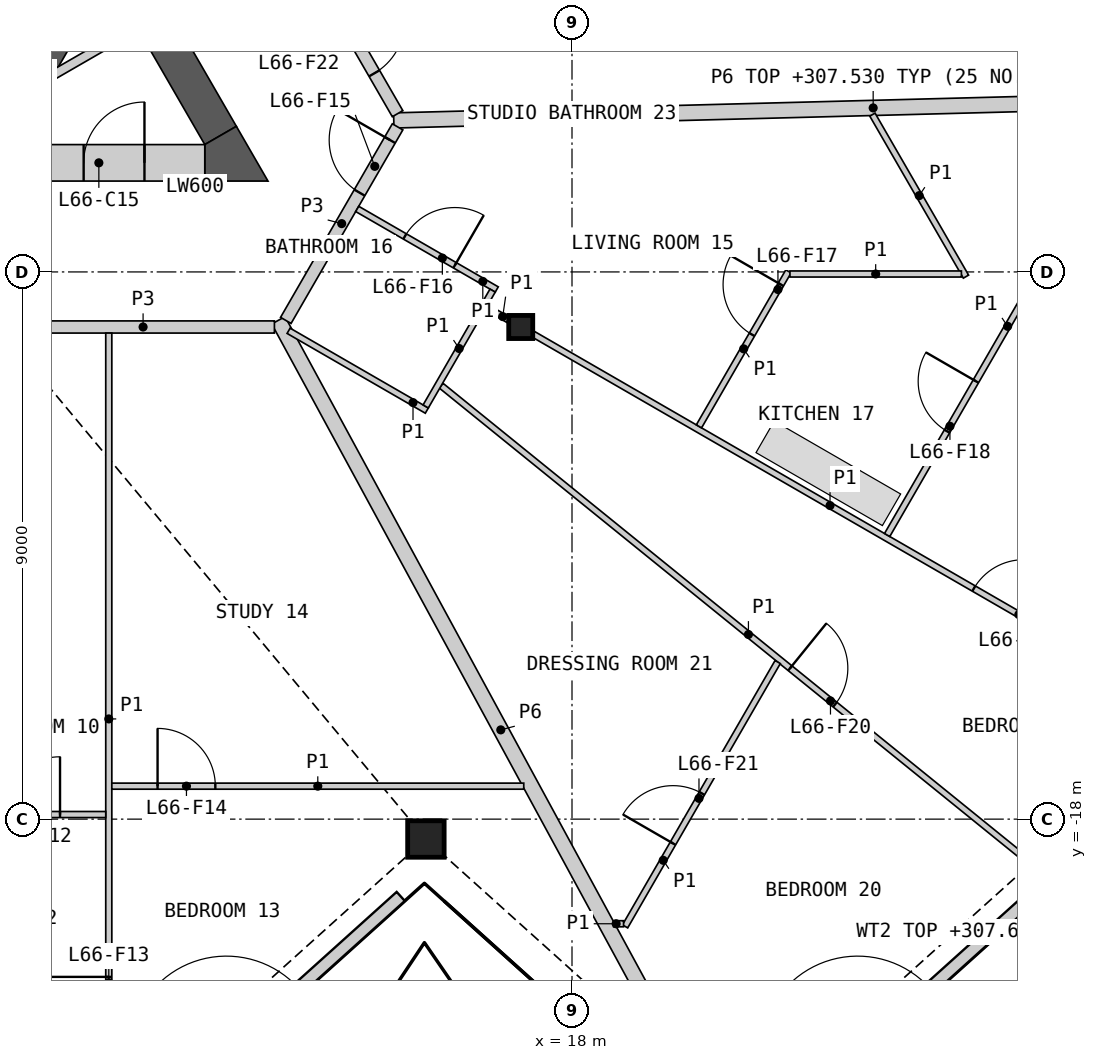
"""IFC4 building model, lengths in metres.
Left out: names, types, materials, properties, quantities, classifications, styles, units other than length and angle.
Written with IfcOpenShell. Run it as: python <this file> out.ifc"""

import sys

from ifc_helpers import new_model, si_unit, direction, frame, frame_2d, origin, origin_2d, place, context, subcontext, project, spatial, polyline, rectangle, hollow_rectangle, i_section, outline, extrude, element, fill, save


model = new_model("IFC4")
c1 = context("Model", 3, precision=1e-05, world=origin(), true_north=direction((0.0, 1.0)))
c2 = subcontext(c1, "Body", "Model", "MODEL_VIEW")
j1 = project(units=[si_unit("LENGTHUNIT", "METRE"), si_unit("PLANEANGLEUNIT", "RADIAN")], contexts=[c1])
p1 = place(None, origin())
s1 = spatial("IfcSite", under=j1, at=p1, CompositionType="ELEMENT")
p2 = place(p1, origin())
s2 = spatial("IfcBuilding", under=s1, at=p2, CompositionType="ELEMENT")
p3 = place(p2, frame((0.0, 0.0, 305.2)))
s3 = spatial("IfcBuildingStorey", under=s2, at=p3, CompositionType="ELEMENT", Elevation=305.2)
p4 = place(p3, frame((15.597, -18.327, 0.0), z_axis=(0.0, 0.0, 1.0), x_axis=(1.0, 0.0, 0.0)))
e1 = element("IfcColumn", 1, at=p4, inside=s3, PredefinedType="COLUMN", context=c2, shape_type="SweptSolid", body=[
    extrude(hollow_rectangle(XDim=0.6, YDim=0.6, WallThickness=0.04, at=origin_2d()), origin(), (0.0, 0.0, 1.0), 3.4),
])
p5 = place(p3, frame((17.157, -9.906, 0.0), z_axis=(0.0, 0.0, 1.0), x_axis=(1.0, 0.0, 0.0)))
e2 = element("IfcColumn", 2, at=p5, inside=s3, PredefinedType="COLUMN", context=c2, shape_type="SweptSolid", body=[
    extrude(i_section(OverallWidth=0.396, OverallDepth=0.381, WebThickness=0.019, FlangeThickness=0.03, at=origin_2d()), origin(), (0.0, 0.0, 1.0), 3.4),
])
p6 = place(p3, frame((10.485, -23.501, 0.0), z_axis=(0.0, 0.0, 1.0), x_axis=(0.743134744054, 0.669141802745, 0.0)))
e3 = element("IfcWall", 3, at=p6, inside=s3, PredefinedType="SOLIDWALL", context=c2, shape_type="SweptSolid", body=[
    extrude(rectangle(XDim=6.322, YDim=0.2, at=frame_2d((3.161, 0.0))), origin(), (0.0, 0.0, 1.0), 2.488),
])
p7 = place(p6, frame((2.463, 0.0, 0.0)))
e4 = element("IfcOpeningElement", 4, at=p7, cuts=e3, PredefinedType="OPENING", context=c2, shape_type="SweptSolid", body=[
    extrude(rectangle(XDim=1.6, YDim=2.25, at=frame_2d((0.8, 1.125))), frame((0.0, 0.11, 0.0), z_axis=(0.0, -1.0, 0.0), x_axis=(1.0, 0.0, 0.0)), (0.0, 0.0, 1.0), 0.22),
])
p8 = place(p3, frame((20.806, -23.556, 0.0), z_axis=(0.0, 0.0, 1.0), x_axis=(0.743145048269, 0.669130358924, 0.0)))
e5 = element("IfcWall", 5, at=p8, inside=s3, PredefinedType="SOLIDWALL", context=c2, shape_type="SweptSolid", body=[
    extrude(rectangle(XDim=6.759, YDim=0.2, at=frame_2d((3.379, 0.0))), origin(), (0.0, 0.0, 1.0), 2.488),
])
p9 = place(p8, frame((2.545, 0.0, 0.0)))
e6 = element("IfcOpeningElement", 6, at=p9, cuts=e5, PredefinedType="OPENING", context=c2, shape_type="SweptSolid", body=[
    extrude(rectangle(XDim=1.6, YDim=2.25, at=frame_2d((0.8, 1.125))), frame((0.0, 0.11, 0.0), z_axis=(0.0, -1.0, 0.0), x_axis=(1.0, 0.0, 0.0)), (0.0, 0.0, 1.0), 0.22),
])
p10 = place(p3, frame((30.488, -6.078, 0.0), z_axis=(0.0, 0.0, 1.0), x_axis=(-0.951062515241, 0.308998530908, 0.0)))
e7 = element("IfcWall", 7, at=p10, inside=s3, PredefinedType="SOLIDWALL", context=c2, shape_type="SweptSolid", body=[
    extrude(rectangle(XDim=6.117, YDim=0.2, at=frame_2d((3.059, 0.0))), origin(), (0.0, 0.0, 1.0), 2.488),
])
p11 = place(p10, frame((2.259, 0.0, 0.0)))
e8 = element("IfcOpeningElement", 8, at=p11, cuts=e7, PredefinedType="OPENING", context=c2, shape_type="SweptSolid", body=[
    extrude(rectangle(XDim=1.6, YDim=2.25, at=frame_2d((0.8, 1.125))), frame((0.0, 0.11, 0.0), z_axis=(0.0, -1.0, 0.0), x_axis=(1.0, 0.0, 0.0)), (0.0, 0.0, 1.0), 0.22),
])
p12 = place(p3, origin())
e9 = element("IfcWall", 9, at=p12, inside=s3, PredefinedType="SHEAR", context=c2, shape_type="SweptSolid", body=[
    extrude(outline(polyline([(8.83, -6.881), (10.374, -4.206), (10.032, -4.298), (8.738, -6.539), (8.83, -6.881)])), origin(), (0.0, 0.0, 1.0), 3.1),
])
p13 = place(p3, frame((10.842, -4.967, 0.0), z_axis=(0.0, 0.0, 1.0), x_axis=(-0.866098216386, -0.499873863663, 0.0)))
e10 = element("IfcWall", 10, at=p13, inside=s3, PredefinedType="PARTITIONING", context=c2, shape_type="SweptSolid", body=[
    extrude(rectangle(XDim=1.582, YDim=0.15, at=frame_2d((0.791, 0.0))), origin(), (0.0, 0.0, 1.0), 3.1),
])
p14 = place(p3, frame((12.221, -6.756, 0.0), z_axis=(0.0, 0.0, 1.0), x_axis=(-0.500020646047, 0.866013483456, 0.0)))
e11 = element("IfcWall", 11, at=p14, inside=s3, PredefinedType="SHEAR", context=c2, shape_type="SweptSolid", body=[
    extrude(rectangle(XDim=4.559, YDim=0.6, at=frame_2d((2.28, 0.0))), origin(), (0.0, 0.0, 1.0), 3.1),
])
p15 = place(p3, origin())
e12 = element("IfcWall", 12, at=p15, inside=s3, PredefinedType="SHEAR", context=c2, shape_type="SweptSolid", body=[
    extrude(outline(polyline([(11.961, -7.506), (11.961, -6.906), (12.48, -6.606), (13.0, -7.506), (11.961, -7.506)])), origin(), (0.0, 0.0, 1.0), 3.1),
])
p16 = place(p3, frame((9.369, -7.206, 0.0), z_axis=(0.0, 0.0, 1.0), x_axis=(1.0, 0.0, 0.0)))
e13 = element("IfcWall", 13, at=p16, inside=s3, PredefinedType="SHEAR", context=c2, shape_type="SweptSolid", body=[
    extrude(rectangle(XDim=2.592, YDim=0.6, at=frame_2d((1.296, 0.0))), origin(), (0.0, 0.0, 1.0), 3.1),
])
p17 = place(p16, frame((0.6, 0.0, 0.0)))
e14 = element("IfcOpeningElement", 14, at=p17, cuts=e13, PredefinedType="OPENING", context=c2, shape_type="SweptSolid", body=[
    extrude(rectangle(XDim=1.0, YDim=2.1, at=frame_2d((0.5, 1.05))), frame((0.0, 0.31, 0.0), z_axis=(0.0, -1.0, 0.0), x_axis=(1.0, 0.0, 0.0)), (0.0, 0.0, 1.0), 0.62),
])
p18 = place(p3, frame((15.069, -6.509, 0.0), z_axis=(0.0, 0.0, 1.0), x_axis=(0.999657828615, 0.026157708023, 0.0)))
e15 = element("IfcWall", 15, at=p18, inside=s3, PredefinedType="PARTITIONING", context=c2, shape_type="SweptSolid", body=[
    extrude(rectangle(XDim=15.773, YDim=0.25, at=frame_2d((7.887, 0.0))), origin(), (0.0, 0.0, 1.0), 2.33),
])
p19 = place(p3, frame((13.171, -9.796, 0.0), z_axis=(0.0, 0.0, 1.0), x_axis=(0.477178668135, -0.878806303275, 0.0)))
e16 = element("IfcWall", 16, at=p19, inside=s3, PredefinedType="PARTITIONING", context=c2, shape_type="SweptSolid", body=[
    extrude(rectangle(XDim=15.33, YDim=0.25, at=frame_2d((7.665, 0.0))), origin(), (0.0, 0.0, 1.0), 2.33),
])
p20 = place(p3, frame((8.786, -9.906, 0.0), z_axis=(0.0, 0.0, 1.0), x_axis=(1.0, 0.0, 0.0)))
e17 = element("IfcWall", 17, at=p20, inside=s3, PredefinedType="PARTITIONING", context=c2, shape_type="SweptSolid", body=[
    extrude(rectangle(XDim=4.32, YDim=0.2, at=frame_2d((2.16, 0.0))), origin(), (0.0, 0.0, 1.0), 3.1),
])
p21 = place(p3, frame((12.988, -2.684, 0.0), z_axis=(0.0, 0.0, 1.0), x_axis=(0.500003406062, -0.866023437285, 0.0)))
e18 = element("IfcWall", 18, at=p21, inside=s3, PredefinedType="PARTITIONING", context=c2, shape_type="SweptSolid", body=[
    extrude(rectangle(XDim=4.288, YDim=0.2, at=frame_2d((2.144, 0.0))), origin(), (0.0, 0.0, 1.0), 3.1),
])
p22 = place(p21, frame((2.521, 0.0, 0.0)))
e19 = element("IfcOpeningElement", 19, at=p22, cuts=e18, PredefinedType="OPENING", context=c2, shape_type="SweptSolid", body=[
    extrude(rectangle(XDim=1.0, YDim=2.1, at=frame_2d((0.5, 1.05))), frame((0.0, 0.11, 0.0), z_axis=(0.0, -1.0, 0.0), x_axis=(1.0, 0.0, 0.0)), (0.0, 0.0, 1.0), 0.22),
])
p23 = place(p3, frame((13.293, -9.797, 0.0), z_axis=(0.0, 0.0, 1.0), x_axis=(0.499967746641, 0.866044024469, 0.0)))
e20 = element("IfcWall", 20, at=p23, inside=s3, PredefinedType="PARTITIONING", context=c2, shape_type="SweptSolid", body=[
    extrude(rectangle(XDim=3.676, YDim=0.2, at=frame_2d((1.838, 0.0))), origin(), (0.0, 0.0, 1.0), 3.1),
])
p24 = place(p23, frame((2.426, 0.0, 0.0)))
e21 = element("IfcOpeningElement", 21, at=p24, cuts=e20, PredefinedType="OPENING", context=c2, shape_type="SweptSolid", body=[
    extrude(rectangle(XDim=1.0, YDim=2.1, at=frame_2d((0.5, 1.05))), frame((0.0, 0.11, 0.0), z_axis=(0.0, -1.0, 0.0), x_axis=(1.0, 0.0, 0.0)), (0.0, 0.0, 1.0), 0.22),
])
p25 = place(p3, frame((15.848, -10.871, 0.0), z_axis=(0.0, 0.0, 1.0), x_axis=(0.77713687197, -0.629331615465, 0.0)))
e22 = element("IfcWall", 22, at=p25, inside=s3, PredefinedType="PARTITIONING", context=c2, shape_type="SweptSolid", body=[
    extrude(rectangle(XDim=13.004, YDim=0.1, at=frame_2d((6.502, 0.0))), origin(), (0.0, 0.0, 1.0), 2.33),
])
p26 = place(p25, frame((7.384, 0.0, 0.0)))
e23 = element("IfcOpeningElement", 23, at=p26, cuts=e22, PredefinedType="OPENING", context=c2, shape_type="SweptSolid", body=[
    extrude(rectangle(XDim=0.95, YDim=2.1, at=frame_2d((0.475, 1.05))), frame((0.0, 0.06, 0.0), z_axis=(0.0, -1.0, 0.0), x_axis=(1.0, 0.0, 0.0)), (0.0, 0.0, 1.0), 0.12),
])
p27 = place(p3, frame((10.382, -22.698, 0.0), z_axis=(0.0, 0.0, 1.0), x_axis=(0.0, 1.0, 0.0)))
e24 = element("IfcWall", 24, at=p27, inside=s3, PredefinedType="PARTITIONING", context=c2, shape_type="SweptSolid", body=[
    extrude(rectangle(XDim=12.692, YDim=0.1, at=frame_2d((6.346, 0.0))), origin(), (0.0, 0.0, 1.0), 2.33),
])
p28 = place(p27, frame((1.153, 0.0, 0.0)))
e25 = element("IfcOpeningElement", 25, at=p28, cuts=e24, PredefinedType="OPENING", context=c2, shape_type="SweptSolid", body=[
    extrude(rectangle(XDim=0.95, YDim=2.1, at=frame_2d((0.475, 1.05))), frame((0.0, 0.06, 0.0), z_axis=(0.0, -1.0, 0.0), x_axis=(1.0, 0.0, 0.0)), (0.0, 0.0, 1.0), 0.12),
])
p29 = place(p3, frame((17.365, -10.025, 0.0), z_axis=(0.0, 0.0, 1.0), x_axis=(0.866021046153, -0.500007547564, 0.0)))
e26 = element("IfcWall", 26, at=p29, inside=s3, PredefinedType="PARTITIONING", context=c2, shape_type="SweptSolid", body=[
    extrude(rectangle(XDim=11.267, YDim=0.1, at=frame_2d((5.634, 0.0))), origin(), (0.0, 0.0, 1.0), 2.33),
])
p30 = place(p29, frame((8.364, 0.0, 0.0)))
e27 = element("IfcOpeningElement", 27, at=p30, cuts=e26, PredefinedType="OPENING", context=c2, shape_type="SweptSolid", body=[
    extrude(rectangle(XDim=0.95, YDim=2.1, at=frame_2d((0.475, 1.05))), frame((0.0, 0.06, 0.0), z_axis=(0.0, -1.0, 0.0), x_axis=(1.0, 0.0, 0.0)), (0.0, 0.0, 1.0), 0.12),
])
p31 = place(p3, frame((0.05, -17.924, 0.0), z_axis=(0.0, 0.0, 1.0), x_axis=(1.0, 0.0, 0.0)))
e28 = element("IfcWall", 28, at=p31, inside=s3, PredefinedType="PARTITIONING", context=c2, shape_type="SweptSolid", body=[
    extrude(rectangle(XDim=10.282, YDim=0.1, at=frame_2d((5.141, 0.0))), origin(), (0.0, 0.0, 1.0), 2.33),
])
p32 = place(p31, frame((0.752, 0.0, 0.0)))
e29 = element("IfcOpeningElement", 29, at=p32, cuts=e28, PredefinedType="OPENING", context=c2, shape_type="SweptSolid", body=[
    extrude(rectangle(XDim=0.95, YDim=2.1, at=frame_2d((0.475, 1.05))), frame((0.0, 0.06, 0.0), z_axis=(0.0, -1.0, 0.0), x_axis=(1.0, 0.0, 0.0)), (0.0, 0.0, 1.0), 0.12),
])
p33 = place(p31, frame((8.58, 0.0, 0.0)))
e30 = element("IfcOpeningElement", 30, at=p33, cuts=e28, PredefinedType="OPENING", context=c2, shape_type="SweptSolid", body=[
    extrude(rectangle(XDim=0.95, YDim=2.1, at=frame_2d((0.475, 1.05))), frame((0.0, 0.06, 0.0), z_axis=(0.0, -1.0, 0.0), x_axis=(1.0, 0.0, 0.0)), (0.0, 0.0, 1.0), 0.12),
])
p34 = place(p3, frame((23.183, -13.327, 0.0), z_axis=(0.0, 0.0, 1.0), x_axis=(0.499991741039, 0.866030172045, 0.0)))
e31 = element("IfcWall", 31, at=p34, inside=s3, PredefinedType="PARTITIONING", context=c2, shape_type="SweptSolid", body=[
    extrude(rectangle(XDim=7.927, YDim=0.1, at=frame_2d((3.963, 0.0))), origin(), (0.0, 0.0, 1.0), 2.33),
])
p35 = place(p34, frame((1.97, 0.0, 0.0)))
e32 = element("IfcOpeningElement", 32, at=p35, cuts=e31, PredefinedType="OPENING", context=c2, shape_type="SweptSolid", body=[
    extrude(rectangle(XDim=0.95, YDim=2.1, at=frame_2d((0.475, 1.05))), frame((0.0, 0.06, 0.0), z_axis=(0.0, -1.0, 0.0), x_axis=(1.0, 0.0, 0.0)), (0.0, 0.0, 1.0), 0.12),
])
p36 = place(p3, frame((10.432, -17.458, 0.0), z_axis=(0.0, 0.0, 1.0), x_axis=(1.0, 0.0, 0.0)))
e33 = element("IfcWall", 33, at=p36, inside=s3, PredefinedType="PARTITIONING", context=c2, shape_type="SweptSolid", body=[
    extrude(rectangle(XDim=6.775, YDim=0.1, at=frame_2d((3.387, 0.0))), origin(), (0.0, 0.0, 1.0), 2.33),
])
p37 = place(p36, frame((0.752, 0.0, 0.0)))
e34 = element("IfcOpeningElement", 34, at=p37, cuts=e33, PredefinedType="OPENING", context=c2, shape_type="SweptSolid", body=[
    extrude(rectangle(XDim=0.95, YDim=2.1, at=frame_2d((0.475, 1.05))), frame((0.0, 0.06, 0.0), z_axis=(0.0, -1.0, 0.0), x_axis=(1.0, 0.0, 0.0)), (0.0, 0.0, 1.0), 0.12),
])
p38 = place(p3, frame((18.873, -19.764, 0.0), z_axis=(0.0, 0.0, 1.0), x_axis=(0.499983455602, 0.866034955486, 0.0)))
e35 = element("IfcWall", 35, at=p38, inside=s3, PredefinedType="PARTITIONING", context=c2, shape_type="SweptSolid", body=[
    extrude(rectangle(XDim=5.02, YDim=0.1, at=frame_2d((2.51, 0.0))), origin(), (0.0, 0.0, 1.0), 2.33),
])
p39 = place(p38, frame((1.576, 0.0, 0.0)))
e36 = element("IfcOpeningElement", 36, at=p39, cuts=e35, PredefinedType="OPENING", context=c2, shape_type="SweptSolid", body=[
    extrude(rectangle(XDim=0.95, YDim=2.1, at=frame_2d((0.475, 1.05))), frame((0.0, 0.06, 0.0), z_axis=(0.0, -1.0, 0.0), x_axis=(1.0, 0.0, 0.0)), (0.0, 0.0, 1.0), 0.12),
])
p40 = place(p3, frame((22.941, -6.413, 0.0), z_axis=(0.0, 0.0, 1.0), x_axis=(0.500013199183, -0.866017783098, 0.0)))
e37 = element("IfcWall", 37, at=p40, inside=s3, PredefinedType="PARTITIONING", context=c2, shape_type="SweptSolid", body=[
    extrude(rectangle(XDim=3.077, YDim=0.1, at=frame_2d((1.539, 0.0))), origin(), (0.0, 0.0, 1.0), 2.33),
])
p41 = place(p3, frame((20.088, -11.54, 0.0), z_axis=(0.0, 0.0, 1.0), x_axis=(0.500055103712, 0.865993587304, 0.0)))
e38 = element("IfcWall", 38, at=p41, inside=s3, PredefinedType="PARTITIONING", context=c2, shape_type="SweptSolid", body=[
    extrude(rectangle(XDim=2.944, YDim=0.1, at=frame_2d((1.472, 0.0))), origin(), (0.0, 0.0, 1.0), 2.33),
])
p42 = place(p41, frame((1.744, 0.0, 0.0)))
e39 = element("IfcOpeningElement", 39, at=p42, cuts=e38, PredefinedType="OPENING", context=c2, shape_type="SweptSolid", body=[
    extrude(rectangle(XDim=0.95, YDim=2.1, at=frame_2d((0.475, 1.05))), frame((0.0, 0.06, 0.0), z_axis=(0.0, -1.0, 0.0), x_axis=(1.0, 0.0, 0.0)), (0.0, 0.0, 1.0), 0.12),
])
p43 = place(p3, frame((21.584, -9.034, 0.0), z_axis=(0.0, 0.0, 1.0), x_axis=(1.0, 0.0, 0.0)))
e40 = element("IfcWall", 40, at=p43, inside=s3, PredefinedType="PARTITIONING", context=c2, shape_type="SweptSolid", body=[
    extrude(rectangle(XDim=2.82, YDim=0.1, at=frame_2d((1.41, 0.0))), origin(), (0.0, 0.0, 1.0), 2.33),
])
p44 = place(p3, frame((14.468, -7.964, 0.0), z_axis=(0.0, 0.0, 1.0), x_axis=(0.865989200783, -0.500062700197, 0.0)))
e41 = element("IfcWall", 41, at=p44, inside=s3, PredefinedType="PARTITIONING", context=c2, shape_type="SweptSolid", body=[
    extrude(rectangle(XDim=2.65, YDim=0.1, at=frame_2d((1.325, 0.0))), origin(), (0.0, 0.0, 1.0), 2.33),
])
p45 = place(p44, frame((0.905, 0.0, 0.0)))
e42 = element("IfcOpeningElement", 42, at=p45, cuts=e41, PredefinedType="OPENING", context=c2, shape_type="SweptSolid", body=[
    extrude(rectangle(XDim=0.95, YDim=2.1, at=frame_2d((0.475, 1.05))), frame((0.0, 0.06, 0.0), z_axis=(0.0, -1.0, 0.0), x_axis=(1.0, 0.0, 0.0)), (0.0, 0.0, 1.0), 0.12),
])
p46 = place(p3, frame((13.339, -9.968, 0.0), z_axis=(0.0, 0.0, 1.0), x_axis=(0.866036909293, -0.499980071345, 0.0)))
e43 = element("IfcWall", 43, at=p46, inside=s3, PredefinedType="PARTITIONING", context=c2, shape_type="SweptSolid", body=[
    extrude(rectangle(XDim=2.625, YDim=0.1, at=frame_2d((1.312, 0.0))), origin(), (0.0, 0.0, 1.0), 2.33),
])
p47 = place(p3, frame((15.594, -11.212, 0.0), z_axis=(0.0, 0.0, 1.0), x_axis=(0.499898558967, 0.866083962871, 0.0)))
e44 = element("IfcWall", 44, at=p47, inside=s3, PredefinedType="PARTITIONING", context=c2, shape_type="SweptSolid", body=[
    extrude(rectangle(XDim=2.2, YDim=0.1, at=frame_2d((1.1, 0.0))), origin(), (0.0, 0.0, 1.0), 2.33),
])
p48 = place(p3, frame((16.594, -9.581, 0.0), z_axis=(0.0, 0.0, 1.0), x_axis=(0.866036909293, -0.499980071345, 0.0)))
e45 = element("IfcWall", 45, at=p48, inside=s3, PredefinedType="PARTITIONING", context=c2, shape_type="SweptSolid", body=[
    extrude(rectangle(XDim=0.41, YDim=0.1, at=frame_2d((0.205, 0.0))), origin(), (0.0, 0.0, 1.0), 2.33),
])
p49 = place(p3, frame((18.685, -19.721, 0.0), z_axis=(0.0, 0.0, 1.0), x_axis=(1.0, 0.0, 0.0)))
e46 = element("IfcWall", 46, at=p49, inside=s3, PredefinedType="PARTITIONING", context=c2, shape_type="SweptSolid", body=[
    extrude(rectangle(XDim=0.162, YDim=0.1, at=frame_2d((0.081, 0.0))), origin(), (0.0, 0.0, 1.0), 2.33),
])
p50 = place(p17, origin())
e47 = element("IfcDoor", 47, at=p50, inside=s3, OperationType="SINGLE_SWING_RIGHT", PredefinedType="DOOR", context=c2, shape_type="SweptSolid", body=[
    extrude(rectangle(XDim=1.0, YDim=2.1, at=frame_2d((0.5, 1.05))), frame((0.0, 0.055, 0.0), z_axis=(0.0, -1.0, 0.0), x_axis=(1.0, 0.0, 0.0)), (0.0, 0.0, 1.0), 0.05),
])
fill(e14, e47)
p51 = place(p33, origin())
e48 = element("IfcDoor", 48, at=p51, inside=s3, OperationType="SINGLE_SWING_RIGHT", PredefinedType="DOOR", context=c2, shape_type="SweptSolid", body=[
    extrude(rectangle(XDim=0.95, YDim=2.1, at=frame_2d((0.475, 1.05))), frame((0.0, 0.025, 0.0), z_axis=(0.0, -1.0, 0.0), x_axis=(1.0, 0.0, 0.0)), (0.0, 0.0, 1.0), 0.05),
])
fill(e30, e48)
p52 = place(p28, origin())
e49 = element("IfcDoor", 49, at=p52, inside=s3, OperationType="SINGLE_SWING_RIGHT", PredefinedType="DOOR", context=c2, shape_type="SweptSolid", body=[
    extrude(rectangle(XDim=0.95, YDim=2.1, at=frame_2d((0.475, 1.05))), frame((0.0, 0.025, 0.0), z_axis=(0.0, -1.0, 0.0), x_axis=(1.0, 0.0, 0.0)), (0.0, 0.0, 1.0), 0.05),
])
fill(e25, e49)
p53 = place(p37, origin())
e50 = element("IfcDoor", 50, at=p53, inside=s3, OperationType="SINGLE_SWING_LEFT", PredefinedType="DOOR", context=c2, shape_type="SweptSolid", body=[
    extrude(rectangle(XDim=0.95, YDim=2.1, at=frame_2d((0.475, 1.05))), frame((0.0, 0.025, 0.0), z_axis=(0.0, -1.0, 0.0), x_axis=(1.0, 0.0, 0.0)), (0.0, 0.0, 1.0), 0.05),
])
fill(e34, e50)
p54 = place(p24, origin())
e51 = element("IfcDoor", 51, at=p54, inside=s3, OperationType="SINGLE_SWING_RIGHT", PredefinedType="DOOR", context=c2, shape_type="SweptSolid", body=[
    extrude(rectangle(XDim=1.0, YDim=2.1, at=frame_2d((0.5, 1.05))), frame((0.0, 0.025, 0.0), z_axis=(0.0, -1.0, 0.0), x_axis=(1.0, 0.0, 0.0)), (0.0, 0.0, 1.0), 0.05),
])
fill(e21, e51)
p55 = place(p45, origin())
e52 = element("IfcDoor", 52, at=p55, inside=s3, OperationType="SINGLE_SWING_RIGHT", PredefinedType="DOOR", context=c2, shape_type="SweptSolid", body=[
    extrude(rectangle(XDim=0.95, YDim=2.1, at=frame_2d((0.475, 1.05))), frame((0.0, 0.025, 0.0), z_axis=(0.0, -1.0, 0.0), x_axis=(1.0, 0.0, 0.0)), (0.0, 0.0, 1.0), 0.05),
])
fill(e42, e52)
p56 = place(p42, origin())
e53 = element("IfcDoor", 53, at=p56, inside=s3, OperationType="SINGLE_SWING_RIGHT", PredefinedType="DOOR", context=c2, shape_type="SweptSolid", body=[
    extrude(rectangle(XDim=0.95, YDim=2.1, at=frame_2d((0.475, 1.05))), frame((0.0, 0.025, 0.0), z_axis=(0.0, -1.0, 0.0), x_axis=(1.0, 0.0, 0.0)), (0.0, 0.0, 1.0), 0.05),
])
fill(e39, e53)
p57 = place(p35, origin())
e54 = element("IfcDoor", 54, at=p57, inside=s3, OperationType="SINGLE_SWING_RIGHT", PredefinedType="DOOR", context=c2, shape_type="SweptSolid", body=[
    extrude(rectangle(XDim=0.95, YDim=2.1, at=frame_2d((0.475, 1.05))), frame((0.0, 0.025, 0.0), z_axis=(0.0, -1.0, 0.0), x_axis=(1.0, 0.0, 0.0)), (0.0, 0.0, 1.0), 0.05),
])
fill(e32, e54)
p58 = place(p30, origin())
e55 = element("IfcDoor", 55, at=p58, inside=s3, OperationType="SINGLE_SWING_RIGHT", PredefinedType="DOOR", context=c2, shape_type="SweptSolid", body=[
    extrude(rectangle(XDim=0.95, YDim=2.1, at=frame_2d((0.475, 1.05))), frame((0.0, 0.025, 0.0), z_axis=(0.0, -1.0, 0.0), x_axis=(1.0, 0.0, 0.0)), (0.0, 0.0, 1.0), 0.05),
])
fill(e27, e55)
p59 = place(p26, origin())
e56 = element("IfcDoor", 56, at=p59, inside=s3, OperationType="SINGLE_SWING_LEFT", PredefinedType="DOOR", context=c2, shape_type="SweptSolid", body=[
    extrude(rectangle(XDim=0.95, YDim=2.1, at=frame_2d((0.475, 1.05))), frame((0.0, 0.025, 0.0), z_axis=(0.0, -1.0, 0.0), x_axis=(1.0, 0.0, 0.0)), (0.0, 0.0, 1.0), 0.05),
])
fill(e23, e56)
p60 = place(p39, origin())
e57 = element("IfcDoor", 57, at=p60, inside=s3, OperationType="SINGLE_SWING_LEFT", PredefinedType="DOOR", context=c2, shape_type="SweptSolid", body=[
    extrude(rectangle(XDim=0.95, YDim=2.1, at=frame_2d((0.475, 1.05))), frame((0.0, 0.025, 0.0), z_axis=(0.0, -1.0, 0.0), x_axis=(1.0, 0.0, 0.0)), (0.0, 0.0, 1.0), 0.05),
])
fill(e36, e57)
p61 = place(p22, origin())
e58 = element("IfcDoor", 58, at=p61, inside=s3, OperationType="SINGLE_SWING_LEFT", PredefinedType="DOOR", context=c2, shape_type="SweptSolid", body=[
    extrude(rectangle(XDim=1.0, YDim=2.1, at=frame_2d((0.5, 1.05))), frame((0.0, 0.025, 0.0), z_axis=(0.0, -1.0, 0.0), x_axis=(1.0, 0.0, 0.0)), (0.0, 0.0, 1.0), 0.05),
])
fill(e19, e58)
save(model, sys.argv[1])
